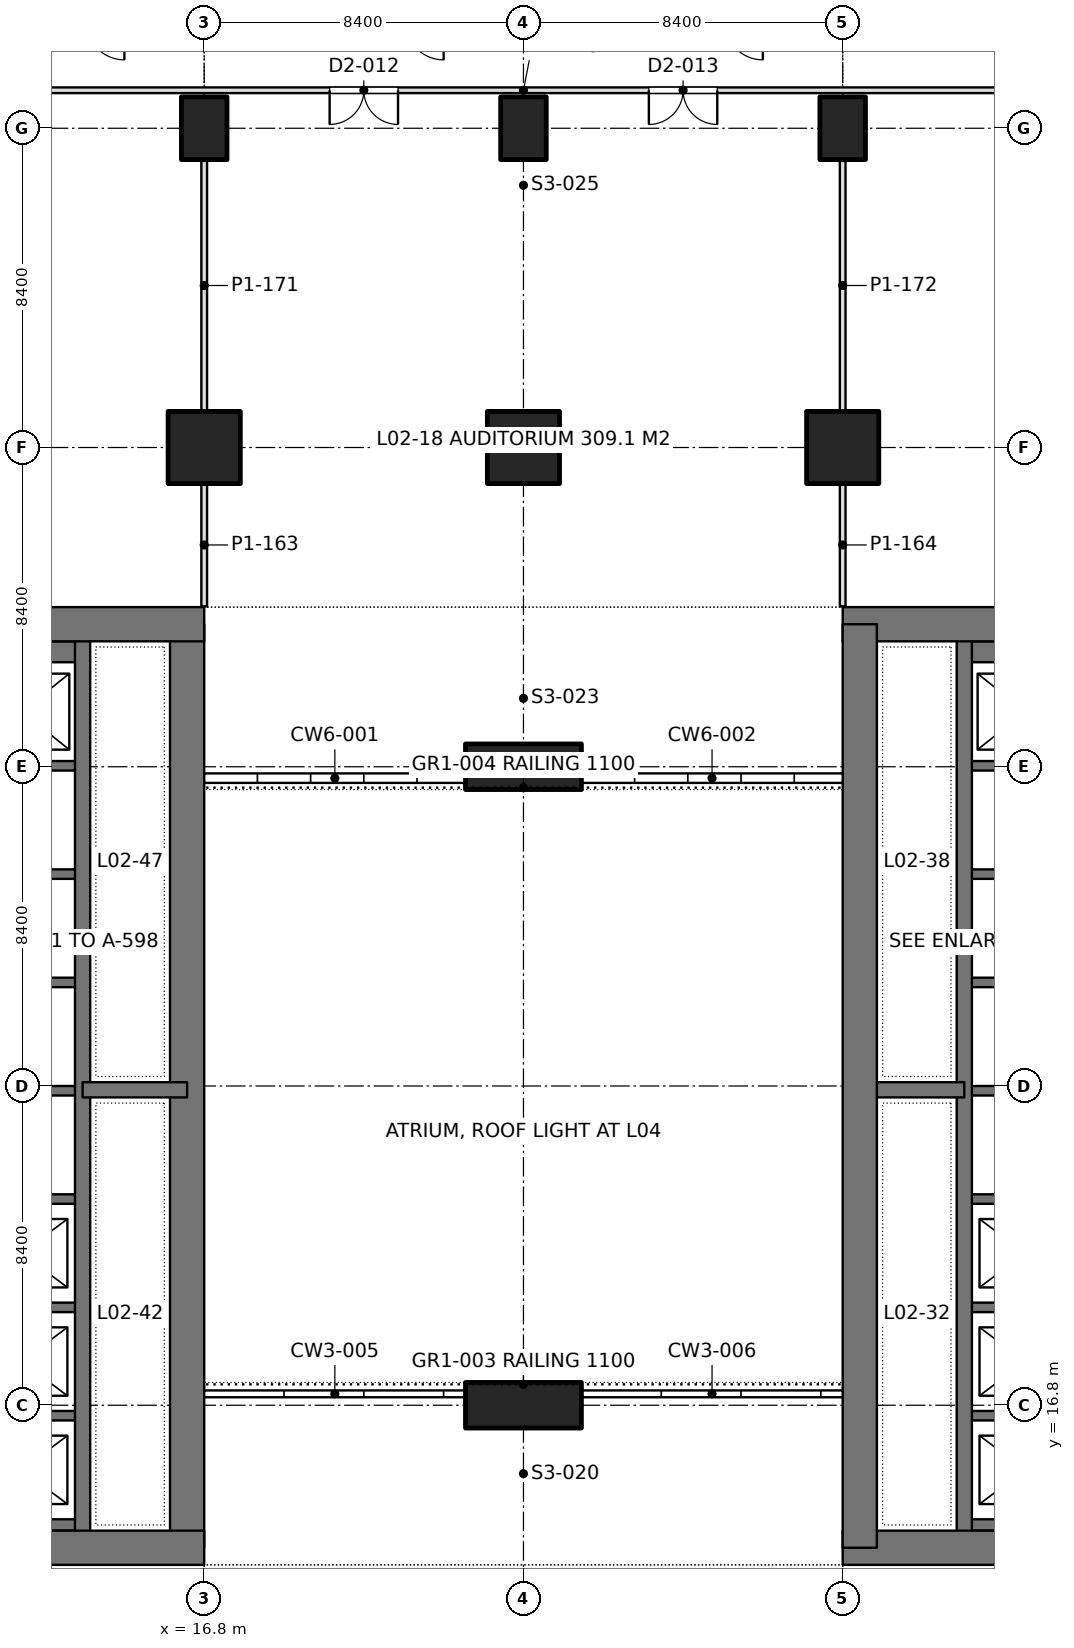
"""IFC4 building model, lengths in metres.
Left out: names, types, materials, properties, quantities, classifications, styles, units other than length and angle.
Written with IfcOpenShell. Run it as: python <this file> out.ifc"""

import sys

from ifc_helpers import new_model, si_unit, direction, frame, frame_2d, origin, origin_2d, place, context, subcontext, project, spatial, rectangle, extrude, element, fill, save


model = new_model("IFC4")
c1 = context("Model", 3, precision=1e-05, world=origin(), true_north=direction((0.0, 1.0)))
c2 = subcontext(c1, "Body", "Model", "MODEL_VIEW")
j1 = project(units=[si_unit("LENGTHUNIT", "METRE"), si_unit("PLANEANGLEUNIT", "RADIAN")], contexts=[c1])
p1 = place(None, origin())
s1 = spatial("IfcSite", under=j1, at=p1, CompositionType="ELEMENT")
p2 = place(p1, origin())
s2 = spatial("IfcBuilding", under=s1, at=p2, CompositionType="ELEMENT")
p3 = place(p2, frame((0.0, 0.0, 9.9)))
s3 = spatial("IfcBuildingStorey", under=s2, at=p3, CompositionType="ELEMENT", Elevation=9.9)
p4 = place(p3, frame((16.8, 42.0, 0.0), z_axis=(0.0, 0.0, 1.0), x_axis=(1.0, 0.0, 0.0)))
e1 = element("IfcColumn", 1, at=p4, inside=s3, PredefinedType="COLUMN", context=c2, shape_type="SweptSolid", body=[
    extrude(rectangle(XDim=1.9, YDim=1.9, at=origin_2d()), origin(), (0.0, 0.0, 1.0), 4.5),
])
p5 = place(p3, frame((16.8, 50.4, 0.0), z_axis=(0.0, 0.0, 1.0), x_axis=(1.0, 0.0, 0.0)))
e2 = element("IfcColumn", 2, at=p5, inside=s3, PredefinedType="COLUMN", context=c2, shape_type="SweptSolid", body=[
    extrude(rectangle(XDim=1.2, YDim=1.65, at=origin_2d()), origin(), (0.0, 0.0, 1.0), 4.5),
])
p6 = place(p3, frame((25.2, 42.0, 0.0), z_axis=(0.0, 0.0, 1.0), x_axis=(1.0, 0.0, 0.0)))
e3 = element("IfcColumn", 3, at=p6, inside=s3, PredefinedType="COLUMN", context=c2, shape_type="SweptSolid", body=[
    extrude(rectangle(XDim=1.9, YDim=1.9, at=origin_2d()), origin(), (0.0, 0.0, 1.0), 4.5),
])
p7 = place(p3, frame((25.2, 50.4, 0.0), z_axis=(0.0, 0.0, 1.0), x_axis=(1.0, 0.0, 0.0)))
e4 = element("IfcColumn", 4, at=p7, inside=s3, PredefinedType="COLUMN", context=c2, shape_type="SweptSolid", body=[
    extrude(rectangle(XDim=1.2, YDim=1.65, at=origin_2d()), origin(), (0.0, 0.0, 1.0), 4.5),
])
for number, where, z_axis, x_axis in (
    (5, (25.2, 16.8, 0.0), (0.0, 0.0, 1.0), (1.0, 0.0, 0.0)),
    (6, (25.2, 33.6, 0.0), (0.0, 0.0, 1.0), (1.0, 0.0, 0.0)),
):
    element("IfcColumn", number, at=place(p3, frame(where, z_axis=z_axis, x_axis=x_axis)), inside=s3, PredefinedType="COLUMN", context=c2, shape_type="SweptSolid", body=[
        extrude(rectangle(XDim=3.05, YDim=1.2, at=origin_2d()), origin(), (0.0, 0.0, 1.0), 4.5),
    ])
p8 = place(p3, frame((33.6, 42.0, 0.0), z_axis=(0.0, 0.0, 1.0), x_axis=(1.0, 0.0, 0.0)))
e7 = element("IfcColumn", 7, at=p8, inside=s3, PredefinedType="COLUMN", context=c2, shape_type="SweptSolid", body=[
    extrude(rectangle(XDim=1.9, YDim=1.9, at=origin_2d()), origin(), (0.0, 0.0, 1.0), 4.5),
])
p9 = place(p3, frame((33.6, 50.4, 0.0), z_axis=(0.0, 0.0, 1.0), x_axis=(1.0, 0.0, 0.0)))
e8 = element("IfcColumn", 8, at=p9, inside=s3, PredefinedType="COLUMN", context=c2, shape_type="SweptSolid", body=[
    extrude(rectangle(XDim=1.2, YDim=1.65, at=origin_2d()), origin(), (0.0, 0.0, 1.0), 4.5),
])
p10 = place(p3, frame((-1.2, 13.05, 0.0), z_axis=(0.0, 0.0, 1.0), x_axis=(1.0, 0.0, 0.0)))
e9 = element("IfcWall", 9, at=p10, inside=s3, PredefinedType="SHEAR", context=c2, shape_type="SweptSolid", body=[
    extrude(rectangle(XDim=18.0, YDim=0.9, at=frame_2d((9.0, 0.0))), origin(), (0.0, 0.0, 1.0), 4.5),
])
p11 = place(p10, frame((8.95, 0.0, 0.0)))
e10 = element("IfcOpeningElement", 10, at=p11, cuts=e9, PredefinedType="OPENING", context=c2, shape_type="SweptSolid", body=[
    extrude(rectangle(XDim=1.8, YDim=2.4, at=frame_2d((0.9, 1.2))), frame((0.0, 0.46, 0.0), z_axis=(0.0, -1.0, 0.0), x_axis=(1.0, 0.0, 0.0)), (0.0, 0.0, 1.0), 0.92),
])
p12 = place(p3, frame((-1.2, 37.35, 0.0), z_axis=(0.0, 0.0, 1.0), x_axis=(1.0, 0.0, 0.0)))
e11 = element("IfcWall", 11, at=p12, inside=s3, PredefinedType="SHEAR", context=c2, shape_type="SweptSolid", body=[
    extrude(rectangle(XDim=18.0, YDim=0.9, at=frame_2d((9.0, 0.0))), origin(), (0.0, 0.0, 1.0), 4.5),
])
p13 = place(p12, frame((8.95, 0.0, 0.0)))
e12 = element("IfcOpeningElement", 12, at=p13, cuts=e11, PredefinedType="OPENING", context=c2, shape_type="SweptSolid", body=[
    extrude(rectangle(XDim=1.8, YDim=2.4, at=frame_2d((0.9, 1.2))), frame((0.0, 0.46, 0.0), z_axis=(0.0, -1.0, 0.0), x_axis=(1.0, 0.0, 0.0)), (0.0, 0.0, 1.0), 0.92),
])
p14 = place(p3, frame((16.35, 13.05, 0.0), z_axis=(0.0, 0.0, 1.0), x_axis=(0.0, 1.0, 0.0)))
e13 = element("IfcWall", 13, at=p14, inside=s3, PredefinedType="SHEAR", context=c2, shape_type="SweptSolid", body=[
    extrude(rectangle(XDim=24.3, YDim=0.9, at=frame_2d((12.15, 0.0))), origin(), (0.0, 0.0, 1.0), 4.5),
])
p15 = place(p3, frame((13.6, 13.05, 0.0), z_axis=(0.0, 0.0, 1.0), x_axis=(0.0, 1.0, 0.0)))
e14 = element("IfcWall", 14, at=p15, inside=s3, PredefinedType="SHEAR", context=c2, shape_type="SweptSolid", body=[
    extrude(rectangle(XDim=24.3, YDim=0.4, at=frame_2d((12.15, 0.0))), origin(), (0.0, 0.0, 1.0), 4.5),
])
p16 = place(p3, frame((13.6, 25.1, 0.0), z_axis=(0.0, 0.0, 1.0), x_axis=(1.0, 0.0, 0.0)))
e15 = element("IfcWall", 15, at=p16, inside=s3, PredefinedType="SHEAR", context=c2, shape_type="SweptSolid", body=[
    extrude(rectangle(XDim=2.75, YDim=0.4, at=frame_2d((1.375, 0.0))), origin(), (0.0, 0.0, 1.0), 4.5),
])
p17 = place(p3, frame((10.4, 13.65, 0.0), z_axis=(0.0, 0.0, 1.0), x_axis=(1.0, 0.0, 0.0)))
e16 = element("IfcWall", 16, at=p17, inside=s3, PredefinedType="SHEAR", context=c2, shape_type="SweptSolid", body=[
    extrude(rectangle(XDim=3.2, YDim=0.3, at=frame_2d((1.6, 0.0))), origin(), (0.0, 0.0, 1.0), 4.5),
])
for number, where, z_axis, x_axis in (
    (17, (10.4, 16.525, 0.0), (0.0, 0.0, 1.0), (1.0, 0.0, 0.0)),
    (18, (10.4, 19.375, 0.0), (0.0, 0.0, 1.0), (1.0, 0.0, 0.0)),
    (19, (10.4, 22.225, 0.0), (0.0, 0.0, 1.0), (1.0, 0.0, 0.0)),
    (20, (10.4, 25.075, 0.0), (0.0, 0.0, 1.0), (1.0, 0.0, 0.0)),
    (21, (10.4, 27.925, 0.0), (0.0, 0.0, 1.0), (1.0, 0.0, 0.0)),
    (22, (10.4, 30.775, 0.0), (0.0, 0.0, 1.0), (1.0, 0.0, 0.0)),
    (23, (10.4, 33.625, 0.0), (0.0, 0.0, 1.0), (1.0, 0.0, 0.0)),
):
    element("IfcWall", number, at=place(p3, frame(where, z_axis=z_axis, x_axis=x_axis)), inside=s3, PredefinedType="SHEAR", context=c2, shape_type="SweptSolid", body=[
        extrude(rectangle(XDim=3.2, YDim=0.25, at=frame_2d((1.6, 0.0))), origin(), (0.0, 0.0, 1.0), 4.5),
    ])
p18 = place(p3, frame((10.4, 36.625, 0.0), z_axis=(0.0, 0.0, 1.0), x_axis=(1.0, 0.0, 0.0)))
e24 = element("IfcWall", 24, at=p18, inside=s3, PredefinedType="SHEAR", context=c2, shape_type="SweptSolid", body=[
    extrude(rectangle(XDim=3.2, YDim=0.55, at=frame_2d((1.6, 0.0))), origin(), (0.0, 0.0, 1.0), 4.5),
])
p19 = place(p3, frame((33.6, 13.05, 0.0), z_axis=(0.0, 0.0, 1.0), x_axis=(1.0, 0.0, 0.0)))
e25 = element("IfcWall", 25, at=p19, inside=s3, PredefinedType="SHEAR", context=c2, shape_type="SweptSolid", body=[
    extrude(rectangle(XDim=18.0, YDim=0.9, at=frame_2d((9.0, 0.0))), origin(), (0.0, 0.0, 1.0), 4.5),
])
p20 = place(p19, frame((7.25, 0.0, 0.0)))
e26 = element("IfcOpeningElement", 26, at=p20, cuts=e25, PredefinedType="OPENING", context=c2, shape_type="SweptSolid", body=[
    extrude(rectangle(XDim=1.8, YDim=2.4, at=frame_2d((0.9, 1.2))), frame((0.0, 0.46, 0.0), z_axis=(0.0, -1.0, 0.0), x_axis=(1.0, 0.0, 0.0)), (0.0, 0.0, 1.0), 0.92),
])
p21 = place(p3, frame((33.6, 37.35, 0.0), z_axis=(0.0, 0.0, 1.0), x_axis=(1.0, 0.0, 0.0)))
e27 = element("IfcWall", 27, at=p21, inside=s3, PredefinedType="SHEAR", context=c2, shape_type="SweptSolid", body=[
    extrude(rectangle(XDim=18.0, YDim=0.9, at=frame_2d((9.0, 0.0))), origin(), (0.0, 0.0, 1.0), 4.5),
])
p22 = place(p21, frame((7.25, 0.0, 0.0)))
e28 = element("IfcOpeningElement", 28, at=p22, cuts=e27, PredefinedType="OPENING", context=c2, shape_type="SweptSolid", body=[
    extrude(rectangle(XDim=1.8, YDim=2.4, at=frame_2d((0.9, 1.2))), frame((0.0, 0.46, 0.0), z_axis=(0.0, -1.0, 0.0), x_axis=(1.0, 0.0, 0.0)), (0.0, 0.0, 1.0), 0.92),
])
p23 = place(p3, frame((34.05, 13.05, 0.0), z_axis=(0.0, 0.0, 1.0), x_axis=(0.0, 1.0, 0.0)))
e29 = element("IfcWall", 29, at=p23, inside=s3, PredefinedType="SHEAR", context=c2, shape_type="SweptSolid", body=[
    extrude(rectangle(XDim=24.3, YDim=0.9, at=frame_2d((12.15, 0.0))), origin(), (0.0, 0.0, 1.0), 4.5),
])
p24 = place(p3, frame((36.8, 13.05, 0.0), z_axis=(0.0, 0.0, 1.0), x_axis=(0.0, 1.0, 0.0)))
e30 = element("IfcWall", 30, at=p24, inside=s3, PredefinedType="SHEAR", context=c2, shape_type="SweptSolid", body=[
    extrude(rectangle(XDim=24.3, YDim=0.4, at=frame_2d((12.15, 0.0))), origin(), (0.0, 0.0, 1.0), 4.5),
])
p25 = place(p3, frame((36.8, 25.1, 0.0), z_axis=(0.0, 0.0, 1.0), x_axis=(-1.0, 0.0, 0.0)))
e31 = element("IfcWall", 31, at=p25, inside=s3, PredefinedType="SHEAR", context=c2, shape_type="SweptSolid", body=[
    extrude(rectangle(XDim=2.75, YDim=0.4, at=frame_2d((1.375, 0.0))), origin(), (0.0, 0.0, 1.0), 4.5),
])
p26 = place(p3, frame((40.0, 13.65, 0.0), z_axis=(0.0, 0.0, 1.0), x_axis=(-1.0, 0.0, 0.0)))
e32 = element("IfcWall", 32, at=p26, inside=s3, PredefinedType="SHEAR", context=c2, shape_type="SweptSolid", body=[
    extrude(rectangle(XDim=3.2, YDim=0.3, at=frame_2d((1.6, 0.0))), origin(), (0.0, 0.0, 1.0), 4.5),
])
for number, where, z_axis, x_axis in (
    (33, (40.0, 16.525, 0.0), (0.0, 0.0, 1.0), (-1.0, 0.0, 0.0)),
    (34, (40.0, 19.375, 0.0), (0.0, 0.0, 1.0), (-1.0, 0.0, 0.0)),
    (35, (40.0, 22.225, 0.0), (0.0, 0.0, 1.0), (-1.0, 0.0, 0.0)),
    (36, (40.0, 25.075, 0.0), (0.0, 0.0, 1.0), (-1.0, 0.0, 0.0)),
    (37, (40.0, 27.925, 0.0), (0.0, 0.0, 1.0), (-1.0, 0.0, 0.0)),
    (38, (40.0, 30.775, 0.0), (0.0, 0.0, 1.0), (-1.0, 0.0, 0.0)),
    (39, (40.0, 33.625, 0.0), (0.0, 0.0, 1.0), (-1.0, 0.0, 0.0)),
):
    element("IfcWall", number, at=place(p3, frame(where, z_axis=z_axis, x_axis=x_axis)), inside=s3, PredefinedType="SHEAR", context=c2, shape_type="SweptSolid", body=[
        extrude(rectangle(XDim=3.2, YDim=0.25, at=frame_2d((1.6, 0.0))), origin(), (0.0, 0.0, 1.0), 4.5),
    ])
p27 = place(p3, frame((40.0, 36.625, 0.0), z_axis=(0.0, 0.0, 1.0), x_axis=(-1.0, 0.0, 0.0)))
e40 = element("IfcWall", 40, at=p27, inside=s3, PredefinedType="SHEAR", context=c2, shape_type="SweptSolid", body=[
    extrude(rectangle(XDim=3.2, YDim=0.55, at=frame_2d((1.6, 0.0))), origin(), (0.0, 0.0, 1.0), 4.5),
])
p28 = place(p3, frame((6.12, 51.4, 0.0), z_axis=(0.0, 0.0, 1.0), x_axis=(1.0, 0.0, 0.0)))
e41 = element("IfcWall", 41, at=p28, inside=s3, PredefinedType="PARTITIONING", context=c2, shape_type="SweptSolid", body=[
    extrude(rectangle(XDim=38.16, YDim=0.15, at=frame_2d((19.08, 0.0))), origin(), (0.0, 0.0, 1.0), 3.65),
])
p29 = place(p28, frame((13.98, 0.0, 0.0)))
e42 = element("IfcOpeningElement", 42, at=p29, cuts=e41, PredefinedType="OPENING", context=c2, shape_type="SweptSolid", body=[
    extrude(rectangle(XDim=1.8, YDim=2.2, at=frame_2d((0.9, 1.1))), frame((0.0, 0.085, 0.0), z_axis=(0.0, -1.0, 0.0), x_axis=(1.0, 0.0, 0.0)), (0.0, 0.0, 1.0), 0.17),
])
p30 = place(p28, frame((22.38, 0.0, 0.0)))
e43 = element("IfcOpeningElement", 43, at=p30, cuts=e41, PredefinedType="OPENING", context=c2, shape_type="SweptSolid", body=[
    extrude(rectangle(XDim=1.8, YDim=2.2, at=frame_2d((0.9, 1.1))), frame((0.0, 0.085, 0.0), z_axis=(0.0, -1.0, 0.0), x_axis=(1.0, 0.0, 0.0)), (0.0, 0.0, 1.0), 0.17),
])
p31 = place(p3, frame((16.8, 37.82, 0.0), z_axis=(0.0, 0.0, 1.0), x_axis=(0.0, 1.0, 0.0)))
e44 = element("IfcWall", 44, at=p31, inside=s3, PredefinedType="PARTITIONING", context=c2, shape_type="SweptSolid", body=[
    extrude(rectangle(XDim=3.231, YDim=0.15, at=frame_2d((1.615, 0.0))), origin(), (0.0, 0.0, 1.0), 3.94),
])
p32 = place(p3, frame((16.8, 42.949, 0.0), z_axis=(0.0, 0.0, 1.0), x_axis=(0.0, 1.0, 0.0)))
e45 = element("IfcWall", 45, at=p32, inside=s3, PredefinedType="PARTITIONING", context=c2, shape_type="SweptSolid", body=[
    extrude(rectangle(XDim=6.627, YDim=0.15, at=frame_2d((3.313, 0.0))), origin(), (0.0, 0.0, 1.0), 3.65),
])
p33 = place(p3, frame((33.6, 37.82, 0.0), z_axis=(0.0, 0.0, 1.0), x_axis=(0.0, 1.0, 0.0)))
e46 = element("IfcWall", 46, at=p33, inside=s3, PredefinedType="PARTITIONING", context=c2, shape_type="SweptSolid", body=[
    extrude(rectangle(XDim=3.231, YDim=0.15, at=frame_2d((1.615, 0.0))), origin(), (0.0, 0.0, 1.0), 3.94),
])
p34 = place(p3, frame((33.6, 42.949, 0.0), z_axis=(0.0, 0.0, 1.0), x_axis=(0.0, 1.0, 0.0)))
e47 = element("IfcWall", 47, at=p34, inside=s3, PredefinedType="PARTITIONING", context=c2, shape_type="SweptSolid", body=[
    extrude(rectangle(XDim=6.627, YDim=0.15, at=frame_2d((3.313, 0.0))), origin(), (0.0, 0.0, 1.0), 3.65),
])
p35 = place(p29, frame((1.8, 0.0, 0.0), z_axis=(0.0, 0.0, 1.0), x_axis=(-1.0, 0.0, 0.0)))
e48 = element("IfcDoor", 48, at=p35, inside=s3, OperationType="DOUBLE_DOOR_SINGLE_SWING", PredefinedType="DOOR", context=c2, shape_type="SweptSolid", body=[
    extrude(rectangle(XDim=1.8, YDim=2.2, at=frame_2d((0.9, 1.1))), frame((0.0, 0.025, 0.0), z_axis=(0.0, -1.0, 0.0), x_axis=(1.0, 0.0, 0.0)), (0.0, 0.0, 1.0), 0.05),
])
fill(e42, e48)
p36 = place(p30, frame((1.8, 0.0, 0.0), z_axis=(0.0, 0.0, 1.0), x_axis=(-1.0, 0.0, 0.0)))
e49 = element("IfcDoor", 49, at=p36, inside=s3, OperationType="DOUBLE_DOOR_SINGLE_SWING", PredefinedType="DOOR", context=c2, shape_type="SweptSolid", body=[
    extrude(rectangle(XDim=1.8, YDim=2.2, at=frame_2d((0.9, 1.1))), frame((0.0, 0.025, 0.0), z_axis=(0.0, -1.0, 0.0), x_axis=(1.0, 0.0, 0.0)), (0.0, 0.0, 1.0), 0.05),
])
fill(e43, e49)
save(model, sys.argv[1])
